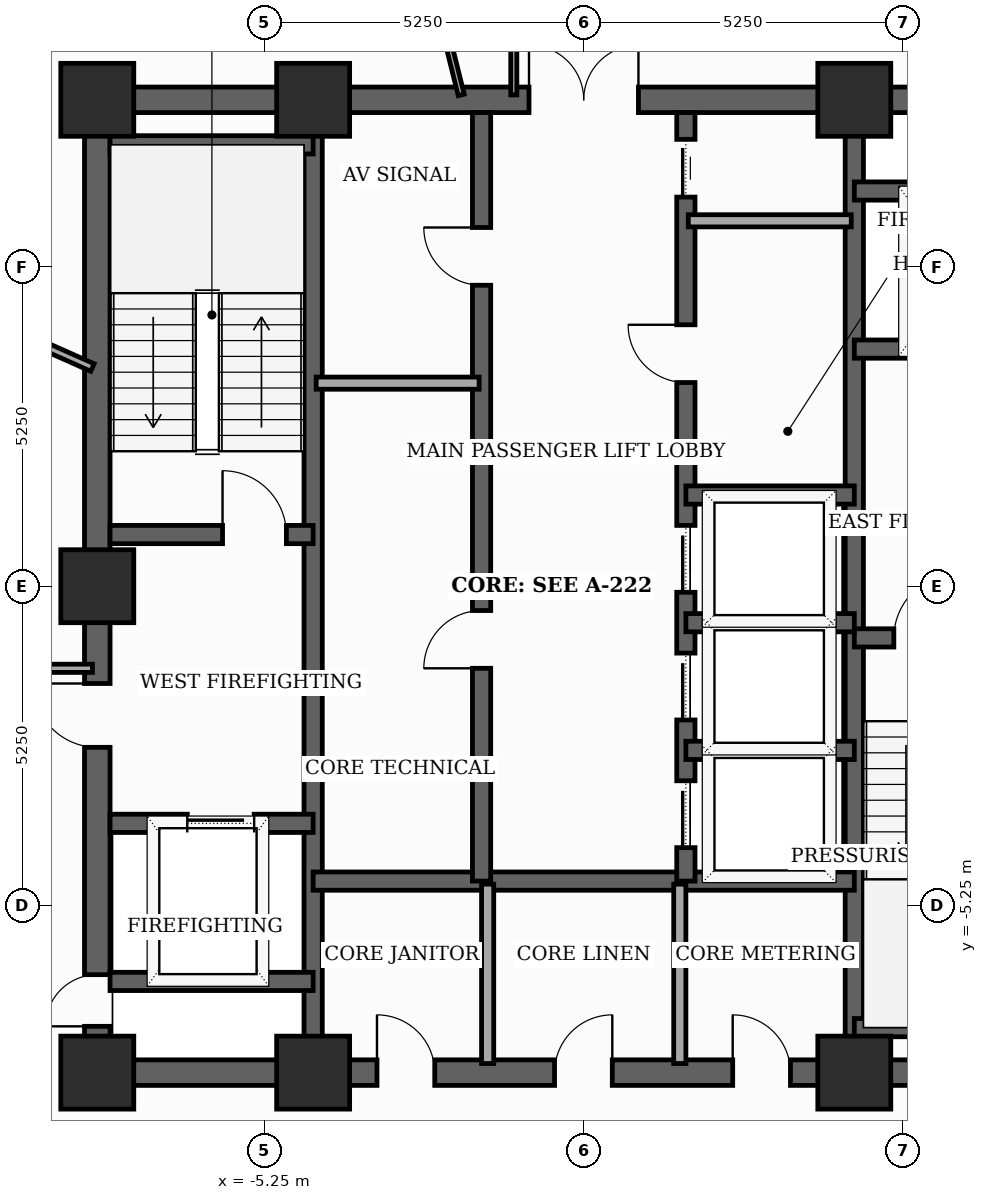
"""IFC4 building model, lengths in metres.
Left out: names, types, materials, properties, quantities, classifications, styles, units other than length and angle.
Written with IfcOpenShell. Run it as: python <this file> out.ifc"""

import sys

from ifc_helpers import new_model, si_unit, direction, frame, frame_2d, origin, origin_2d, place, context, subcontext, project, spatial, rectangle, extrude, element, fill, save


model = new_model("IFC4")
c1 = context("Model", 3, precision=1e-05, world=origin(), true_north=direction((0.0, 1.0)))
c2 = subcontext(c1, "Body", "Model", "MODEL_VIEW")
j1 = project(units=[si_unit("LENGTHUNIT", "METRE"), si_unit("PLANEANGLEUNIT", "RADIAN")], contexts=[c1])
p1 = place(None, origin())
s1 = spatial("IfcSite", under=j1, at=p1, CompositionType="ELEMENT")
p2 = place(p1, origin())
s2 = spatial("IfcBuilding", under=s1, at=p2, CompositionType="ELEMENT")
p3 = place(p2, frame((0.0, 0.0, 237.4)))
s3 = spatial("IfcBuildingStorey", under=s2, at=p3, CompositionType="ELEMENT", Elevation=237.4)
for number, where, z_axis, x_axis in (
    (1, (-8.0, -8.0, 0.0), (0.0, 0.0, 1.0), (1.0, 0.0, 0.0)),
    (2, (-4.45, -8.0, 0.0), (0.0, 0.0, 1.0), (1.0, 0.0, 0.0)),
    (3, (4.45, -8.0, 0.0), (0.0, 0.0, 1.0), (1.0, 0.0, 0.0)),
    (4, (4.45, 8.0, 0.0), (0.0, 0.0, 1.0), (1.0, 0.0, 0.0)),
    (5, (-4.45, 8.0, 0.0), (0.0, 0.0, 1.0), (1.0, 0.0, 0.0)),
    (6, (-8.0, 8.0, 0.0), (0.0, 0.0, 1.0), (1.0, 0.0, 0.0)),
    (7, (-8.0, 0.0, 0.0), (0.0, 0.0, 1.0), (1.0, 0.0, 0.0)),
):
    element("IfcColumn", number, at=place(p3, frame(where, z_axis=z_axis, x_axis=x_axis)), inside=s3, PredefinedType="COLUMN", context=c2, shape_type="SweptSolid", body=[
        extrude(rectangle(XDim=1.2, YDim=1.2, at=origin_2d()), origin(), (0.0, 0.0, 1.0), 3.7),
    ])
p4 = place(p3, frame((-8.0, -8.0, 0.0), z_axis=(0.0, 0.0, 1.0), x_axis=(0.0, 1.0, 0.0)))
e8 = element("IfcWall", 8, at=p4, inside=s3, PredefinedType="SHEAR", context=c2, shape_type="SweptSolid", body=[
    extrude(rectangle(XDim=16.0, YDim=0.42, at=frame_2d((8.0, 0.0))), origin(), (0.0, 0.0, 1.0), 3.5),
])
p5 = place(p4, frame((0.761, 0.0, 0.0)))
e9 = element("IfcOpeningElement", 9, at=p5, cuts=e8, PredefinedType="OPENING", context=c2, shape_type="SweptSolid", body=[
    extrude(rectangle(XDim=0.85, YDim=2.02, at=frame_2d((0.425, 1.01))), frame((0.0, 0.22, 0.0), z_axis=(0.0, -1.0, 0.0), x_axis=(1.0, 0.0, 0.0)), (0.0, 0.0, 1.0), 0.44),
])
p6 = place(p4, frame((5.35, 0.0, 0.0)))
e10 = element("IfcOpeningElement", 10, at=p6, cuts=e8, PredefinedType="OPENING", context=c2, shape_type="SweptSolid", body=[
    extrude(rectangle(XDim=1.05, YDim=2.15, at=frame_2d((0.525, 1.075))), frame((0.0, 0.22, 0.0), z_axis=(0.0, -1.0, 0.0), x_axis=(1.0, 0.0, 0.0)), (0.0, 0.0, 1.0), 0.44),
])
p7 = place(p3, frame((-8.0, -8.0, 0.0), z_axis=(0.0, 0.0, 1.0), x_axis=(1.0, 0.0, 0.0)))
e11 = element("IfcWall", 11, at=p7, inside=s3, PredefinedType="SHEAR", context=c2, shape_type="SweptSolid", body=[
    extrude(rectangle(XDim=16.0, YDim=0.42, at=frame_2d((8.0, 0.0))), origin(), (0.0, 0.0, 1.0), 3.5),
])
p8 = place(p7, frame((4.6, 0.0, 0.0)))
e12 = element("IfcOpeningElement", 12, at=p8, cuts=e11, PredefinedType="OPENING", context=c2, shape_type="SweptSolid", body=[
    extrude(rectangle(XDim=0.95, YDim=2.1, at=frame_2d((0.475, 1.05))), frame((0.0, 0.22, 0.0), z_axis=(0.0, -1.0, 0.0), x_axis=(1.0, 0.0, 0.0)), (0.0, 0.0, 1.0), 0.44),
])
p9 = place(p7, frame((7.52, 0.0, 0.0)))
e13 = element("IfcOpeningElement", 13, at=p9, cuts=e11, PredefinedType="OPENING", context=c2, shape_type="SweptSolid", body=[
    extrude(rectangle(XDim=0.95, YDim=2.1, at=frame_2d((0.475, 1.05))), frame((0.0, 0.22, 0.0), z_axis=(0.0, -1.0, 0.0), x_axis=(1.0, 0.0, 0.0)), (0.0, 0.0, 1.0), 0.44),
])
p10 = place(p7, frame((10.45, 0.0, 0.0)))
e14 = element("IfcOpeningElement", 14, at=p10, cuts=e11, PredefinedType="OPENING", context=c2, shape_type="SweptSolid", body=[
    extrude(rectangle(XDim=0.95, YDim=2.1, at=frame_2d((0.475, 1.05))), frame((0.0, 0.22, 0.0), z_axis=(0.0, -1.0, 0.0), x_axis=(1.0, 0.0, 0.0)), (0.0, 0.0, 1.0), 0.44),
])
p11 = place(p3, frame((-8.0, 8.0, 0.0), z_axis=(0.0, 0.0, 1.0), x_axis=(1.0, 0.0, 0.0)))
e15 = element("IfcWall", 15, at=p11, inside=s3, PredefinedType="SHEAR", context=c2, shape_type="SweptSolid", body=[
    extrude(rectangle(XDim=16.0, YDim=0.42, at=frame_2d((8.0, 0.0))), origin(), (0.0, 0.0, 1.0), 3.5),
])
p12 = place(p11, frame((7.1, 0.0, 0.0)))
e16 = element("IfcOpeningElement", 16, at=p12, cuts=e15, PredefinedType="OPENING", context=c2, shape_type="SweptSolid", body=[
    extrude(rectangle(XDim=1.8, YDim=2.15, at=frame_2d((0.9, 1.075))), frame((0.0, 0.22, 0.0), z_axis=(0.0, -1.0, 0.0), x_axis=(1.0, 0.0, 0.0)), (0.0, 0.0, 1.0), 0.44),
])
for number, where, z_axis, x_axis in (
    (17, (-4.45, -7.79, 0.0), (0.0, 0.0, 1.0), (0.0, 1.0, 0.0)),
    (18, (4.45, -7.79, 0.0), (0.0, 0.0, 1.0), (0.0, 1.0, 0.0)),
):
    element("IfcWall", number, at=place(p3, frame(where, z_axis=z_axis, x_axis=x_axis)), inside=s3, PredefinedType="SHEAR", context=c2, shape_type="SweptSolid", body=[
        extrude(rectangle(XDim=15.58, YDim=0.3, at=frame_2d((7.79, 0.0))), origin(), (0.0, 0.0, 1.0), 3.5),
    ])
p13 = place(p3, frame((-7.79, 0.85, 0.0), z_axis=(0.0, 0.0, 1.0), x_axis=(1.0, 0.0, 0.0)))
e19 = element("IfcWall", 19, at=p13, inside=s3, PredefinedType="SHEAR", context=c2, shape_type="SweptSolid", body=[
    extrude(rectangle(XDim=3.34, YDim=0.3, at=frame_2d((1.67, 0.0))), origin(), (0.0, 0.0, 1.0), 3.5),
])
p14 = place(p13, frame((1.85, 0.0, 0.0)))
e20 = element("IfcOpeningElement", 20, at=p14, cuts=e19, PredefinedType="OPENING", context=c2, shape_type="SweptSolid", body=[
    extrude(rectangle(XDim=1.05, YDim=2.15, at=frame_2d((0.525, 1.075))), frame((0.0, 0.16, 0.0), z_axis=(0.0, -1.0, 0.0), x_axis=(1.0, 0.0, 0.0)), (0.0, 0.0, 1.0), 0.32),
])
p15 = place(p3, frame((-7.79, 7.26, 0.0), z_axis=(0.0, 0.0, 1.0), x_axis=(1.0, 0.0, 0.0)))
e21 = element("IfcWall", 21, at=p15, inside=s3, PredefinedType="SHEAR", context=c2, shape_type="SweptSolid", body=[
    extrude(rectangle(XDim=3.34, YDim=0.3, at=frame_2d((1.67, 0.0))), origin(), (0.0, 0.0, 1.0), 3.5),
])
p16 = place(p3, frame((4.45, -0.85, 0.0), z_axis=(0.0, 0.0, 1.0), x_axis=(1.0, 0.0, 0.0)))
e22 = element("IfcWall", 22, at=p16, inside=s3, PredefinedType="SHEAR", context=c2, shape_type="SweptSolid", body=[
    extrude(rectangle(XDim=3.34, YDim=0.3, at=frame_2d((1.67, 0.0))), origin(), (0.0, 0.0, 1.0), 3.5),
])
p17 = place(p16, frame((0.65, 0.0, 0.0)))
e23 = element("IfcOpeningElement", 23, at=p17, cuts=e22, PredefinedType="OPENING", context=c2, shape_type="SweptSolid", body=[
    extrude(rectangle(XDim=1.05, YDim=2.15, at=frame_2d((0.525, 1.075))), frame((0.0, 0.16, 0.0), z_axis=(0.0, -1.0, 0.0), x_axis=(1.0, 0.0, 0.0)), (0.0, 0.0, 1.0), 0.32),
])
p18 = place(p3, frame((4.45, -7.26, 0.0), z_axis=(0.0, 0.0, 1.0), x_axis=(1.0, 0.0, 0.0)))
e24 = element("IfcWall", 24, at=p18, inside=s3, PredefinedType="SHEAR", context=c2, shape_type="SweptSolid", body=[
    extrude(rectangle(XDim=3.55, YDim=0.3, at=frame_2d((1.775, 0.0))), origin(), (0.0, 0.0, 1.0), 3.5),
])
p19 = place(p3, frame((-7.79, -3.9, 0.0), z_axis=(0.0, 0.0, 1.0), x_axis=(1.0, 0.0, 0.0)))
e25 = element("IfcWall", 25, at=p19, inside=s3, PredefinedType="SHEAR", context=c2, shape_type="SweptSolid", body=[
    extrude(rectangle(XDim=3.34, YDim=0.3, at=frame_2d((1.67, 0.0))), origin(), (0.0, 0.0, 1.0), 3.5),
])
p20 = place(p19, frame((1.27, 0.0, 0.0)))
e26 = element("IfcOpeningElement", 26, at=p20, cuts=e25, PredefinedType="OPENING", context=c2, shape_type="SweptSolid", body=[
    extrude(rectangle(XDim=1.1, YDim=2.1, at=frame_2d((0.55, 1.05))), frame((0.0, 0.16, 0.0), z_axis=(0.0, -1.0, 0.0), x_axis=(1.0, 0.0, 0.0)), (0.0, 0.0, 1.0), 0.32),
])
p21 = place(p3, frame((-7.79, -6.5, 0.0), z_axis=(0.0, 0.0, 1.0), x_axis=(1.0, 0.0, 0.0)))
e27 = element("IfcWall", 27, at=p21, inside=s3, PredefinedType="SHEAR", context=c2, shape_type="SweptSolid", body=[
    extrude(rectangle(XDim=3.34, YDim=0.3, at=frame_2d((1.67, 0.0))), origin(), (0.0, 0.0, 1.0), 3.5),
])
p22 = place(p3, frame((4.45, 3.9, 0.0), z_axis=(0.0, 0.0, 1.0), x_axis=(1.0, 0.0, 0.0)))
e28 = element("IfcWall", 28, at=p22, inside=s3, PredefinedType="SHEAR", context=c2, shape_type="SweptSolid", body=[
    extrude(rectangle(XDim=3.34, YDim=0.3, at=frame_2d((1.67, 0.0))), origin(), (0.0, 0.0, 1.0), 3.5),
])
p23 = place(p22, frame((1.18, 0.0, 0.0)))
e29 = element("IfcOpeningElement", 29, at=p23, cuts=e28, PredefinedType="OPENING", context=c2, shape_type="SweptSolid", body=[
    extrude(rectangle(XDim=1.1, YDim=2.1, at=frame_2d((0.55, 1.05))), frame((0.0, 0.16, 0.0), z_axis=(0.0, -1.0, 0.0), x_axis=(1.0, 0.0, 0.0)), (0.0, 0.0, 1.0), 0.32),
])
p24 = place(p3, frame((4.45, 6.5, 0.0), z_axis=(0.0, 0.0, 1.0), x_axis=(1.0, 0.0, 0.0)))
e30 = element("IfcWall", 30, at=p24, inside=s3, PredefinedType="SHEAR", context=c2, shape_type="SweptSolid", body=[
    extrude(rectangle(XDim=3.34, YDim=0.3, at=frame_2d((1.67, 0.0))), origin(), (0.0, 0.0, 1.0), 3.5),
])
p25 = place(p3, frame((-4.45, -4.85, 0.0), z_axis=(0.0, 0.0, 1.0), x_axis=(1.0, 0.0, 0.0)))
e31 = element("IfcWall", 31, at=p25, inside=s3, PredefinedType="SHEAR", context=c2, shape_type="SweptSolid", body=[
    extrude(rectangle(XDim=8.9, YDim=0.3, at=frame_2d((4.45, 0.0))), origin(), (0.0, 0.0, 1.0), 3.5),
])
p26 = place(p3, frame((-1.68, -4.85, 0.0), z_axis=(0.0, 0.0, 1.0), x_axis=(0.0, 1.0, 0.0)))
e32 = element("IfcWall", 32, at=p26, inside=s3, PredefinedType="SHEAR", context=c2, shape_type="SweptSolid", body=[
    extrude(rectangle(XDim=12.64, YDim=0.3, at=frame_2d((6.32, 0.0))), origin(), (0.0, 0.0, 1.0), 3.5),
])
p27 = place(p26, frame((3.5, 0.0, 0.0)))
e33 = element("IfcOpeningElement", 33, at=p27, cuts=e32, PredefinedType="OPENING", context=c2, shape_type="SweptSolid", body=[
    extrude(rectangle(XDim=0.95, YDim=2.1, at=frame_2d((0.475, 1.05))), frame((0.0, 0.16, 0.0), z_axis=(0.0, -1.0, 0.0), x_axis=(1.0, 0.0, 0.0)), (0.0, 0.0, 1.0), 0.32),
])
p28 = place(p26, frame((9.8, 0.0, 0.0)))
e34 = element("IfcOpeningElement", 34, at=p28, cuts=e32, PredefinedType="OPENING", context=c2, shape_type="SweptSolid", body=[
    extrude(rectangle(XDim=0.95, YDim=2.1, at=frame_2d((0.475, 1.05))), frame((0.0, 0.16, 0.0), z_axis=(0.0, -1.0, 0.0), x_axis=(1.0, 0.0, 0.0)), (0.0, 0.0, 1.0), 0.32),
])
p29 = place(p3, frame((1.68, -4.85, 0.0), z_axis=(0.0, 0.0, 1.0), x_axis=(0.0, 1.0, 0.0)))
e35 = element("IfcWall", 35, at=p29, inside=s3, PredefinedType="SHEAR", context=c2, shape_type="SweptSolid", body=[
    extrude(rectangle(XDim=12.64, YDim=0.3, at=frame_2d((6.32, 0.0))), origin(), (0.0, 0.0, 1.0), 3.5),
])
p30 = place(p29, frame((0.55, 0.0, 0.0)))
e36 = element("IfcOpeningElement", 36, at=p30, cuts=e35, PredefinedType="OPENING", context=c2, shape_type="SweptSolid", body=[
    extrude(rectangle(XDim=1.1, YDim=2.1, at=frame_2d((0.55, 1.05))), frame((0.0, 0.16, 0.0), z_axis=(0.0, -1.0, 0.0), x_axis=(1.0, 0.0, 0.0)), (0.0, 0.0, 1.0), 0.32),
])
p31 = place(p29, frame((2.65, 0.0, 0.0)))
e37 = element("IfcOpeningElement", 37, at=p31, cuts=e35, PredefinedType="OPENING", context=c2, shape_type="SweptSolid", body=[
    extrude(rectangle(XDim=1.1, YDim=2.1, at=frame_2d((0.55, 1.05))), frame((0.0, 0.16, 0.0), z_axis=(0.0, -1.0, 0.0), x_axis=(1.0, 0.0, 0.0)), (0.0, 0.0, 1.0), 0.32),
])
p32 = place(p29, frame((4.75, 0.0, 0.0)))
e38 = element("IfcOpeningElement", 38, at=p32, cuts=e35, PredefinedType="OPENING", context=c2, shape_type="SweptSolid", body=[
    extrude(rectangle(XDim=1.1, YDim=2.1, at=frame_2d((0.55, 1.05))), frame((0.0, 0.16, 0.0), z_axis=(0.0, -1.0, 0.0), x_axis=(1.0, 0.0, 0.0)), (0.0, 0.0, 1.0), 0.32),
])
p33 = place(p29, frame((8.2, 0.0, 0.0)))
e39 = element("IfcOpeningElement", 39, at=p33, cuts=e35, PredefinedType="OPENING", context=c2, shape_type="SweptSolid", body=[
    extrude(rectangle(XDim=0.95, YDim=2.1, at=frame_2d((0.475, 1.05))), frame((0.0, 0.16, 0.0), z_axis=(0.0, -1.0, 0.0), x_axis=(1.0, 0.0, 0.0)), (0.0, 0.0, 1.0), 0.32),
])
p34 = place(p29, frame((11.25, 0.0, 0.0)))
e40 = element("IfcOpeningElement", 40, at=p34, cuts=e35, PredefinedType="OPENING", context=c2, shape_type="SweptSolid", body=[
    extrude(rectangle(XDim=0.95, YDim=2.1, at=frame_2d((0.475, 1.05))), frame((0.0, 0.16, 0.0), z_axis=(0.0, -1.0, 0.0), x_axis=(1.0, 0.0, 0.0)), (0.0, 0.0, 1.0), 0.32),
])
for number, where, z_axis, x_axis in (
    (41, (1.68, 1.5, 0.0), (0.0, 0.0, 1.0), (1.0, 0.0, 0.0)),
    (42, (1.68, -2.7, 0.0), (0.0, 0.0, 1.0), (1.0, 0.0, 0.0)),
    (43, (1.68, -0.6, 0.0), (0.0, 0.0, 1.0), (1.0, 0.0, 0.0)),
):
    element("IfcWall", number, at=place(p3, frame(where, z_axis=z_axis, x_axis=x_axis)), inside=s3, PredefinedType="SHEAR", context=c2, shape_type="SweptSolid", body=[
        extrude(rectangle(XDim=2.77, YDim=0.3, at=frame_2d((1.385, 0.0))), origin(), (0.0, 0.0, 1.0), 3.5),
    ])
for number, where, z_axis, x_axis in (
    (44, (-1.58, -7.85, 0.0), (0.0, 0.0, 1.0), (0.0, 1.0, 0.0)),
    (45, (1.58, -7.85, 0.0), (0.0, 0.0, 1.0), (0.0, 1.0, 0.0)),
):
    element("IfcWall", number, at=place(p3, frame(where, z_axis=z_axis, x_axis=x_axis)), inside=s3, PredefinedType="SOLIDWALL", context=c2, shape_type="SweptSolid", body=[
        extrude(rectangle(XDim=2.95, YDim=0.2, at=frame_2d((1.475, 0.0))), origin(), (0.0, 0.0, 1.0), 2.885),
    ])
for number, where, z_axis, x_axis in (
    (46, (-4.4, 3.34, 0.0), (0.0, 0.0, 1.0), (1.0, 0.0, 0.0)),
    (47, (1.72, 6.01, 0.0), (0.0, 0.0, 1.0), (1.0, 0.0, 0.0)),
):
    element("IfcWall", number, at=place(p3, frame(where, z_axis=z_axis, x_axis=x_axis)), inside=s3, PredefinedType="SOLIDWALL", context=c2, shape_type="SweptSolid", body=[
        extrude(rectangle(XDim=2.68, YDim=0.2, at=frame_2d((1.34, 0.0))), origin(), (0.0, 0.0, 1.0), 3.5),
    ])
p35 = place(p3, frame((-8.08, -1.35, 0.0), z_axis=(0.0, 0.0, 1.0), x_axis=(-1.0, 0.0, 0.0)))
e48 = element("IfcWall", 48, at=p35, inside=s3, PredefinedType="PARTITIONING", context=c2, shape_type="SweptSolid", body=[
    extrude(rectangle(XDim=2.57, YDim=0.135, at=frame_2d((1.285, 0.0))), origin(), (0.0, 0.0, 1.0), 2.885),
])
p36 = place(p3, frame((-1.15, 10.65, 0.0), z_axis=(0.0, 0.0, 1.0), x_axis=(0.0, -1.0, 0.0)))
e49 = element("IfcWall", 49, at=p36, inside=s3, PredefinedType="MOVABLE", context=c2, shape_type="SweptSolid", body=[
    extrude(rectangle(XDim=2.57, YDim=0.1, at=frame_2d((1.285, 0.0))), origin(), (0.0, 0.0, 1.0), 2.885),
])
p37 = place(p3, frame((-8.08, 3.597, 0.0), z_axis=(0.0, 0.0, 1.0), x_axis=(-0.913494385598, 0.40685133339, 0.0)))
e50 = element("IfcWall", 50, at=p37, inside=s3, PredefinedType="PARTITIONING", context=c2, shape_type="SweptSolid", body=[
    extrude(rectangle(XDim=6.894, YDim=0.135, at=frame_2d((3.447, 0.0))), origin(), (0.0, 0.0, 1.0), 2.885),
])
p38 = place(p3, frame((-3.808, 15.271, 0.0), z_axis=(0.0, 0.0, 1.0), x_axis=(0.241993010569, -0.970277992555, 0.0)))
e51 = element("IfcWall", 51, at=p38, inside=s3, PredefinedType="MOVABLE", context=c2, shape_type="SweptSolid", body=[
    extrude(rectangle(XDim=7.411, YDim=0.1, at=frame_2d((3.706, 0.0))), origin(), (0.0, 0.0, 1.0), 2.885),
])
p39 = place(p38, frame((3.246, 0.0, 0.0)))
e52 = element("IfcOpeningElement", 52, at=p39, cuts=e51, PredefinedType="OPENING", context=c2, shape_type="SweptSolid", body=[
    extrude(rectangle(XDim=0.92, YDim=2.1, at=frame_2d((0.46, 1.05))), frame((0.0, 0.06, 0.0), z_axis=(0.0, -1.0, 0.0), x_axis=(1.0, 0.0, 0.0)), (0.0, 0.0, 1.0), 0.12),
])
p40 = place(p5, origin())
e53 = element("IfcDoor", 53, at=p40, inside=s3, OperationType="SINGLE_SWING_LEFT", PredefinedType="TRAPDOOR", context=c2, shape_type="SweptSolid", body=[
    extrude(rectangle(XDim=0.85, YDim=2.02, at=frame_2d((0.425, 1.01))), frame((0.0, 0.025, 0.0), z_axis=(0.0, -1.0, 0.0), x_axis=(1.0, 0.0, 0.0)), (0.0, 0.0, 1.0), 0.05),
])
fill(e9, e53)
p41 = place(p6, origin())
e54 = element("IfcDoor", 54, at=p41, inside=s3, OperationType="SINGLE_SWING_RIGHT", PredefinedType="DOOR", context=c2, shape_type="SweptSolid", body=[
    extrude(rectangle(XDim=1.05, YDim=2.15, at=frame_2d((0.525, 1.075))), frame((0.0, 0.025, 0.0), z_axis=(0.0, -1.0, 0.0), x_axis=(1.0, 0.0, 0.0)), (0.0, 0.0, 1.0), 0.05),
])
fill(e10, e54)
p42 = place(p8, origin())
e55 = element("IfcDoor", 55, at=p42, inside=s3, OperationType="SINGLE_SWING_LEFT", PredefinedType="DOOR", context=c2, shape_type="SweptSolid", body=[
    extrude(rectangle(XDim=0.95, YDim=2.1, at=frame_2d((0.475, 1.05))), frame((0.0, 0.025, 0.0), z_axis=(0.0, -1.0, 0.0), x_axis=(1.0, 0.0, 0.0)), (0.0, 0.0, 1.0), 0.05),
])
fill(e12, e55)
p43 = place(p9, origin())
e56 = element("IfcDoor", 56, at=p43, inside=s3, OperationType="SINGLE_SWING_RIGHT", PredefinedType="DOOR", context=c2, shape_type="SweptSolid", body=[
    extrude(rectangle(XDim=0.95, YDim=2.1, at=frame_2d((0.475, 1.05))), frame((0.0, 0.025, 0.0), z_axis=(0.0, -1.0, 0.0), x_axis=(1.0, 0.0, 0.0)), (0.0, 0.0, 1.0), 0.05),
])
fill(e13, e56)
p44 = place(p10, origin())
e57 = element("IfcDoor", 57, at=p44, inside=s3, OperationType="SINGLE_SWING_LEFT", PredefinedType="DOOR", context=c2, shape_type="SweptSolid", body=[
    extrude(rectangle(XDim=0.95, YDim=2.1, at=frame_2d((0.475, 1.05))), frame((0.0, 0.025, 0.0), z_axis=(0.0, -1.0, 0.0), x_axis=(1.0, 0.0, 0.0)), (0.0, 0.0, 1.0), 0.05),
])
fill(e14, e57)
p45 = place(p12, origin())
e58 = element("IfcDoor", 58, at=p45, inside=s3, OperationType="DOUBLE_DOOR_SINGLE_SWING", PredefinedType="DOOR", context=c2, shape_type="SweptSolid", body=[
    extrude(rectangle(XDim=1.8, YDim=2.15, at=frame_2d((0.9, 1.075))), frame((0.0, 0.025, 0.0), z_axis=(0.0, -1.0, 0.0), x_axis=(1.0, 0.0, 0.0)), (0.0, 0.0, 1.0), 0.05),
])
fill(e16, e58)
p46 = place(p14, origin())
e59 = element("IfcDoor", 59, at=p46, inside=s3, OperationType="SINGLE_SWING_LEFT", PredefinedType="DOOR", context=c2, shape_type="SweptSolid", body=[
    extrude(rectangle(XDim=1.05, YDim=2.15, at=frame_2d((0.525, 1.075))), frame((0.0, 0.025, 0.0), z_axis=(0.0, -1.0, 0.0), x_axis=(1.0, 0.0, 0.0)), (0.0, 0.0, 1.0), 0.05),
])
fill(e20, e59)
p47 = place(p17, origin())
e60 = element("IfcDoor", 60, at=p47, inside=s3, OperationType="SINGLE_SWING_RIGHT", PredefinedType="DOOR", context=c2, shape_type="SweptSolid", body=[
    extrude(rectangle(XDim=1.05, YDim=2.15, at=frame_2d((0.525, 1.075))), frame((0.0, 0.025, 0.0), z_axis=(0.0, -1.0, 0.0), x_axis=(1.0, 0.0, 0.0)), (0.0, 0.0, 1.0), 0.05),
])
fill(e23, e60)
p48 = place(p20, origin())
e61 = element("IfcDoor", 61, at=p48, inside=s3, OperationType="SLIDING_TO_LEFT", PredefinedType="DOOR", context=c2, shape_type="SweptSolid", body=[
    extrude(rectangle(XDim=1.1, YDim=2.1, at=frame_2d((0.55, 1.05))), frame((0.0, 0.025, 0.0), z_axis=(0.0, -1.0, 0.0), x_axis=(1.0, 0.0, 0.0)), (0.0, 0.0, 1.0), 0.05),
])
fill(e26, e61)
p49 = place(p27, origin())
e62 = element("IfcDoor", 62, at=p49, inside=s3, OperationType="SINGLE_SWING_LEFT", PredefinedType="DOOR", context=c2, shape_type="SweptSolid", body=[
    extrude(rectangle(XDim=0.95, YDim=2.1, at=frame_2d((0.475, 1.05))), frame((0.0, 0.025, 0.0), z_axis=(0.0, -1.0, 0.0), x_axis=(1.0, 0.0, 0.0)), (0.0, 0.0, 1.0), 0.05),
])
fill(e33, e62)
p50 = place(p28, origin())
e63 = element("IfcDoor", 63, at=p50, inside=s3, OperationType="SINGLE_SWING_RIGHT", PredefinedType="DOOR", context=c2, shape_type="SweptSolid", body=[
    extrude(rectangle(XDim=0.95, YDim=2.1, at=frame_2d((0.475, 1.05))), frame((0.0, 0.025, 0.0), z_axis=(0.0, -1.0, 0.0), x_axis=(1.0, 0.0, 0.0)), (0.0, 0.0, 1.0), 0.05),
])
fill(e34, e63)
p51 = place(p30, origin())
e64 = element("IfcDoor", 64, at=p51, inside=s3, OperationType="SLIDING_TO_LEFT", PredefinedType="DOOR", context=c2, shape_type="SweptSolid", body=[
    extrude(rectangle(XDim=1.1, YDim=2.1, at=frame_2d((0.55, 1.05))), frame((0.0, 0.025, 0.0), z_axis=(0.0, -1.0, 0.0), x_axis=(1.0, 0.0, 0.0)), (0.0, 0.0, 1.0), 0.05),
])
fill(e36, e64)
p52 = place(p31, origin())
e65 = element("IfcDoor", 65, at=p52, inside=s3, OperationType="SLIDING_TO_LEFT", PredefinedType="DOOR", context=c2, shape_type="SweptSolid", body=[
    extrude(rectangle(XDim=1.1, YDim=2.1, at=frame_2d((0.55, 1.05))), frame((0.0, 0.025, 0.0), z_axis=(0.0, -1.0, 0.0), x_axis=(1.0, 0.0, 0.0)), (0.0, 0.0, 1.0), 0.05),
])
fill(e37, e65)
p53 = place(p32, origin())
e66 = element("IfcDoor", 66, at=p53, inside=s3, OperationType="SLIDING_TO_LEFT", PredefinedType="DOOR", context=c2, shape_type="SweptSolid", body=[
    extrude(rectangle(XDim=1.1, YDim=2.1, at=frame_2d((0.55, 1.05))), frame((0.0, 0.025, 0.0), z_axis=(0.0, -1.0, 0.0), x_axis=(1.0, 0.0, 0.0)), (0.0, 0.0, 1.0), 0.05),
])
fill(e38, e66)
p54 = place(p33, origin())
e67 = element("IfcDoor", 67, at=p54, inside=s3, OperationType="SINGLE_SWING_RIGHT", PredefinedType="DOOR", context=c2, shape_type="SweptSolid", body=[
    extrude(rectangle(XDim=0.95, YDim=2.1, at=frame_2d((0.475, 1.05))), frame((0.0, 0.025, 0.0), z_axis=(0.0, -1.0, 0.0), x_axis=(1.0, 0.0, 0.0)), (0.0, 0.0, 1.0), 0.05),
])
fill(e39, e67)
p55 = place(p34, origin())
e68 = element("IfcDoor", 68, at=p55, inside=s3, OperationType="SLIDING_TO_LEFT", PredefinedType="DOOR", context=c2, shape_type="SweptSolid", body=[
    extrude(rectangle(XDim=0.95, YDim=2.1, at=frame_2d((0.475, 1.05))), frame((0.0, 0.025, 0.0), z_axis=(0.0, -1.0, 0.0), x_axis=(1.0, 0.0, 0.0)), (0.0, 0.0, 1.0), 0.05),
])
fill(e40, e68)
save(model, sys.argv[1])
